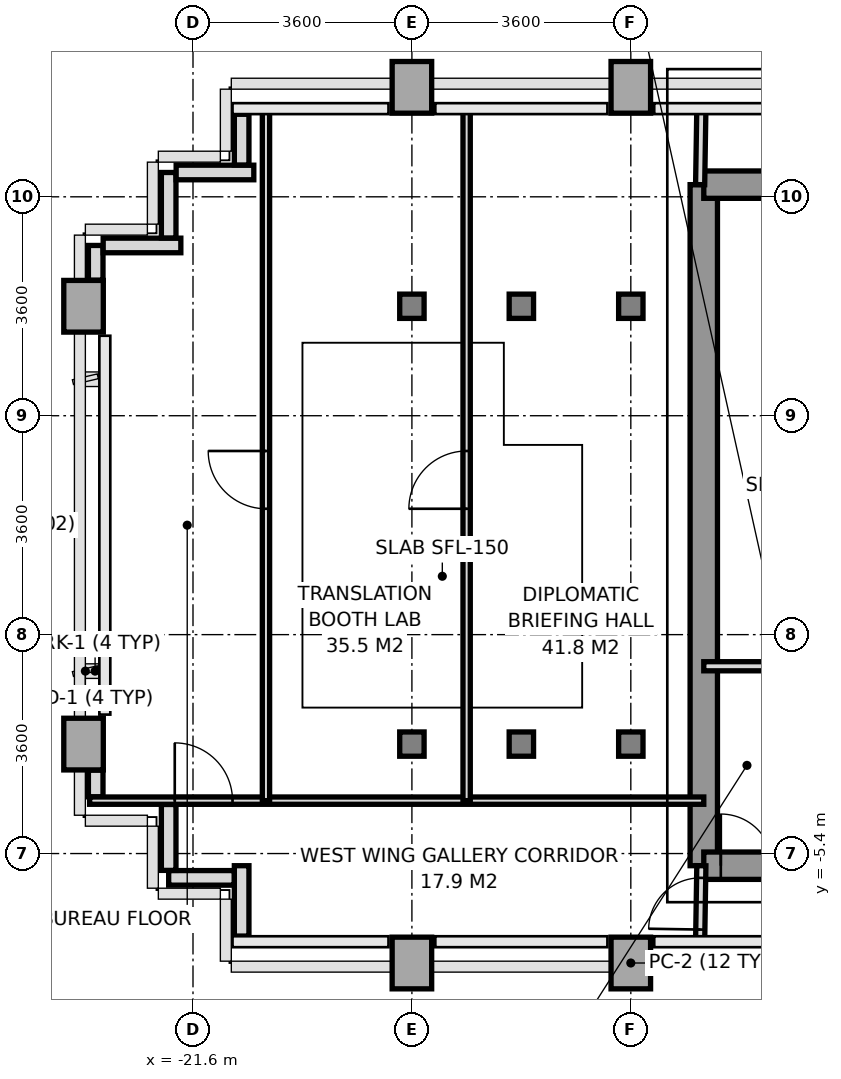
"""IFC4 building model, lengths in metres.
Left out: names, types, materials, properties, quantities, classifications, styles, units other than length and angle.
Written with IfcOpenShell. Run it as: python <this file> out.ifc"""

import sys

from ifc_helpers import new_model, si_unit, direction, frame, frame_2d, origin, origin_2d, place, context, subcontext, project, spatial, rectangle, i_section, extrude, source, transform, mapped, element, fill, save


model = new_model("IFC4")
c1 = context("Model", 3, precision=1e-05, world=origin(), true_north=direction((0.0, 1.0)))
c2 = subcontext(c1, "Body", "Model", "MODEL_VIEW")
j1 = project(units=[si_unit("LENGTHUNIT", "METRE"), si_unit("PLANEANGLEUNIT", "RADIAN")], contexts=[c1])
p1 = place(None, origin())
s1 = spatial("IfcSite", under=j1, at=p1, CompositionType="ELEMENT")
p2 = place(p1, origin())
s2 = spatial("IfcBuilding", under=s1, at=p2, CompositionType="ELEMENT")
p3 = place(p2, frame((0.0, 0.0, 121.0)))
s3 = spatial("IfcBuildingStorey", under=s2, at=p3, CompositionType="ELEMENT", Elevation=121.0)
m1 = source(origin(), c2, "Body", "SweptSolid", [
    extrude(rectangle(XDim=0.65, YDim=0.85, at=origin_2d()), origin(), (0.0, 0.0, 1.0), 3.2),
])
for number, where, z_axis, x_axis in (
    (1, (-23.4, -3.6, 0.0), (0.0, 0.0, 1.0), (1.0, 0.0, 0.0)),
    (2, (-23.4, 3.6, 0.0), (0.0, 0.0, 1.0), (1.0, 0.0, 0.0)),
    (3, (-18.0, -7.2, 0.0), (0.0, 0.0, 1.0), (1.0, 0.0, 0.0)),
):
    element("IfcColumn", number, at=place(p3, frame(where, z_axis=z_axis, x_axis=x_axis)), inside=s3, PredefinedType="COLUMN", context=c2, shape_type="MappedRepresentation", body=[
        mapped(m1, transform((0.0, 0.0, 0.0), x_axis=(1.0, 0.0, 0.0), y_axis=(0.0, 1.0, 0.0), z_axis=(0.0, 0.0, 1.0), scale=1.0)),
    ])
m2 = source(origin(), c2, "Body", "SweptSolid", [
    extrude(i_section(OverallWidth=0.401, OverallDepth=0.399, WebThickness=0.02, FlangeThickness=0.032, at=origin_2d()), origin(), (0.0, 0.0, 1.0), 3.2),
])
for number, where, z_axis, x_axis in (
    (4, (-18.0, -3.6, 0.0), (0.0, 0.0, 1.0), (1.0, 0.0, 0.0)),
    (5, (-18.0, 3.6, 0.0), (0.0, 0.0, 1.0), (1.0, 0.0, 0.0)),
):
    element("IfcColumn", number, at=place(p3, frame(where, z_axis=z_axis, x_axis=x_axis)), inside=s3, PredefinedType="COLUMN", context=c2, shape_type="MappedRepresentation", body=[
        mapped(m2, transform((0.0, 0.0, 0.0), x_axis=(1.0, 0.0, 0.0), y_axis=(0.0, 1.0, 0.0), z_axis=(0.0, 0.0, 1.0), scale=1.0)),
    ])
p4 = place(p3, frame((-18.0, 7.2, 0.0), z_axis=(0.0, 0.0, 1.0), x_axis=(1.0, 0.0, 0.0)))
e6 = element("IfcColumn", 6, at=p4, inside=s3, PredefinedType="COLUMN", context=c2, shape_type="MappedRepresentation", body=[
    mapped(m1, transform((0.0, 0.0, 0.0), x_axis=(1.0, 0.0, 0.0), y_axis=(0.0, 1.0, 0.0), z_axis=(0.0, 0.0, 1.0), scale=1.0)),
])
for number, where, z_axis, x_axis in (
    (7, (-16.2, -3.6, 0.0), (0.0, 0.0, 1.0), (1.0, 0.0, 0.0)),
    (8, (-16.2, 3.6, 0.0), (0.0, 0.0, 1.0), (1.0, 0.0, 0.0)),
):
    element("IfcColumn", number, at=place(p3, frame(where, z_axis=z_axis, x_axis=x_axis)), inside=s3, PredefinedType="COLUMN", context=c2, shape_type="MappedRepresentation", body=[
        mapped(m2, transform((0.0, 0.0, 0.0), x_axis=(1.0, 0.0, 0.0), y_axis=(0.0, 1.0, 0.0), z_axis=(0.0, 0.0, 1.0), scale=1.0)),
    ])
p5 = place(p3, frame((-14.4, -7.2, 0.0), z_axis=(0.0, 0.0, 1.0), x_axis=(1.0, 0.0, 0.0)))
e9 = element("IfcColumn", 9, at=p5, inside=s3, PredefinedType="COLUMN", context=c2, shape_type="MappedRepresentation", body=[
    mapped(m1, transform((0.0, 0.0, 0.0), x_axis=(1.0, 0.0, 0.0), y_axis=(0.0, 1.0, 0.0), z_axis=(0.0, 0.0, 1.0), scale=1.0)),
])
for number, where, z_axis, x_axis in (
    (10, (-14.4, -3.6, 0.0), (0.0, 0.0, 1.0), (1.0, 0.0, 0.0)),
    (11, (-14.4, 3.6, 0.0), (0.0, 0.0, 1.0), (1.0, 0.0, 0.0)),
):
    element("IfcColumn", number, at=place(p3, frame(where, z_axis=z_axis, x_axis=x_axis)), inside=s3, PredefinedType="COLUMN", context=c2, shape_type="MappedRepresentation", body=[
        mapped(m2, transform((0.0, 0.0, 0.0), x_axis=(1.0, 0.0, 0.0), y_axis=(0.0, 1.0, 0.0), z_axis=(0.0, 0.0, 1.0), scale=1.0)),
    ])
p6 = place(p3, frame((-14.4, 7.2, 0.0), z_axis=(0.0, 0.0, 1.0), x_axis=(1.0, 0.0, 0.0)))
e12 = element("IfcColumn", 12, at=p6, inside=s3, PredefinedType="COLUMN", context=c2, shape_type="MappedRepresentation", body=[
    mapped(m1, transform((0.0, 0.0, 0.0), x_axis=(1.0, 0.0, 0.0), y_axis=(0.0, 1.0, 0.0), z_axis=(0.0, 0.0, 1.0), scale=1.0)),
])
p7 = place(p3, frame((-20.8, -6.757, 0.0), z_axis=(0.0, 0.0, 1.0), x_axis=(0.0, 1.0, 0.0)))
e13 = element("IfcWall", 13, at=p7, inside=s3, PredefinedType="PARAPET", context=c2, shape_type="SweptSolid", body=[
    extrude(rectangle(XDim=1.157, YDim=0.24, at=frame_2d((0.579, 0.0))), origin(), (0.0, 0.0, 1.0), 1.15),
])
p8 = place(p3, frame((-20.923, -5.8, 0.0), z_axis=(0.0, 0.0, 1.0), x_axis=(-1.0, 0.0, 0.0)))
e14 = element("IfcWall", 14, at=p8, inside=s3, PredefinedType="PARAPET", context=c2, shape_type="SweptSolid", body=[
    extrude(rectangle(XDim=1.077, YDim=0.24, at=frame_2d((0.539, 0.0))), origin(), (0.0, 0.0, 1.0), 1.15),
])
p9 = place(p3, frame((-22.0, -5.677, 0.0), z_axis=(0.0, 0.0, 1.0), x_axis=(0.0, 1.0, 0.0)))
e15 = element("IfcWall", 15, at=p9, inside=s3, PredefinedType="PARAPET", context=c2, shape_type="SweptSolid", body=[
    extrude(rectangle(XDim=1.084, YDim=0.24, at=frame_2d((0.542, 0.0))), origin(), (0.0, 0.0, 1.0), 1.15),
])
p10 = place(p3, frame((-23.2, -4.467, 0.0), z_axis=(0.0, 0.0, 1.0), x_axis=(0.0, 1.0, 0.0)))
e16 = element("IfcWall", 16, at=p10, inside=s3, PredefinedType="PARAPET", context=c2, shape_type="SweptSolid", body=[
    extrude(rectangle(XDim=0.439, YDim=0.24, at=frame_2d((0.219, 0.0))), origin(), (0.0, 0.0, 1.0), 1.15),
])
p11 = place(p3, frame((-23.2, 4.028, 0.0), z_axis=(0.0, 0.0, 1.0), x_axis=(0.0, 1.0, 0.0)))
e17 = element("IfcWall", 17, at=p11, inside=s3, PredefinedType="PARAPET", context=c2, shape_type="SweptSolid", body=[
    extrude(rectangle(XDim=0.572, YDim=0.24, at=frame_2d((0.286, 0.0))), origin(), (0.0, 0.0, 1.0), 1.15),
])
p12 = place(p3, frame((-23.077, 4.6, 0.0), z_axis=(0.0, 0.0, 1.0), x_axis=(1.0, 0.0, 0.0)))
e18 = element("IfcWall", 18, at=p12, inside=s3, PredefinedType="PARAPET", context=c2, shape_type="SweptSolid", body=[
    extrude(rectangle(XDim=1.277, YDim=0.24, at=frame_2d((0.638, 0.0))), origin(), (0.0, 0.0, 1.0), 1.15),
])
p13 = place(p3, frame((-22.0, 4.723, 0.0), z_axis=(0.0, 0.0, 1.0), x_axis=(0.0, 1.0, 0.0)))
e19 = element("IfcWall", 19, at=p13, inside=s3, PredefinedType="PARAPET", context=c2, shape_type="SweptSolid", body=[
    extrude(rectangle(XDim=1.077, YDim=0.24, at=frame_2d((0.539, 0.0))), origin(), (0.0, 0.0, 1.0), 1.15),
])
p14 = place(p3, frame((-21.877, 5.8, 0.0), z_axis=(0.0, 0.0, 1.0), x_axis=(1.0, 0.0, 0.0)))
e20 = element("IfcWall", 20, at=p14, inside=s3, PredefinedType="PARAPET", context=c2, shape_type="SweptSolid", body=[
    extrude(rectangle(XDim=1.277, YDim=0.24, at=frame_2d((0.638, 0.0))), origin(), (0.0, 0.0, 1.0), 1.15),
])
p15 = place(p3, frame((-20.8, 5.923, 0.0), z_axis=(0.0, 0.0, 1.0), x_axis=(0.0, 1.0, 0.0)))
e21 = element("IfcWall", 21, at=p15, inside=s3, PredefinedType="PARAPET", context=c2, shape_type="SweptSolid", body=[
    extrude(rectangle(XDim=0.834, YDim=0.24, at=frame_2d((0.417, 0.0))), origin(), (0.0, 0.0, 1.0), 1.15),
])
p16 = place(p3, frame((-13.2, -5.6, 0.0), z_axis=(0.0, 0.0, 1.0), x_axis=(0.0, 1.0, 0.0)))
e22 = element("IfcWall", 22, at=p16, inside=s3, PredefinedType="SHEAR", context=c2, shape_type="SweptSolid", body=[
    extrude(rectangle(XDim=11.2, YDim=0.45, at=frame_2d((5.6, 0.0))), origin(), (0.0, 0.0, 1.0), 3.2),
])
p17 = place(p3, frame((-13.2, 5.6, 0.0), z_axis=(0.0, 0.0, 1.0), x_axis=(1.0, 0.0, 0.0)))
e23 = element("IfcWall", 23, at=p17, inside=s3, PredefinedType="SHEAR", context=c2, shape_type="SweptSolid", body=[
    extrude(rectangle(XDim=1.819, YDim=0.45, at=frame_2d((0.909, 0.0))), origin(), (0.0, 0.0, 1.0), 3.2),
])
p18 = place(p3, frame((-13.2, -5.6, 0.0), z_axis=(0.0, 0.0, 1.0), x_axis=(1.0, 0.0, 0.0)))
e24 = element("IfcWall", 24, at=p18, inside=s3, PredefinedType="SHEAR", context=c2, shape_type="SweptSolid", body=[
    extrude(rectangle(XDim=7.8, YDim=0.45, at=frame_2d((3.9, 0.0))), origin(), (0.0, 0.0, 1.0), 3.2),
])
p19 = place(p18, frame((3.6, 0.0, 0.0)))
e25 = element("IfcOpeningElement", 25, at=p19, cuts=e24, PredefinedType="OPENING", context=c2, shape_type="SweptSolid", body=[
    extrude(rectangle(XDim=1.2, YDim=2.2, at=frame_2d((0.6, 1.1))), frame((0.0, 0.235, 0.0), z_axis=(0.0, -1.0, 0.0), x_axis=(1.0, 0.0, 0.0)), (0.0, 0.0, 1.0), 0.47),
])
p20 = place(p18, frame((0.28, 0.0, 0.0)))
e26 = element("IfcOpeningElement", 26, at=p20, cuts=e24, PredefinedType="OPENING", context=c2, shape_type="SweptSolid", body=[
    extrude(rectangle(XDim=0.85, YDim=2.1, at=frame_2d((0.425, 1.05))), frame((0.0, 0.235, 0.0), z_axis=(0.0, -1.0, 0.0), x_axis=(1.0, 0.0, 0.0)), (0.0, 0.0, 1.0), 0.47),
])
p21 = place(p18, frame((1.36, 0.0, 0.0)))
e27 = element("IfcOpeningElement", 27, at=p21, cuts=e24, PredefinedType="OPENING", context=c2, shape_type="SweptSolid", body=[
    extrude(rectangle(XDim=0.85, YDim=2.1, at=frame_2d((0.425, 1.05))), frame((0.0, 0.235, 0.0), z_axis=(0.0, -1.0, 0.0), x_axis=(1.0, 0.0, 0.0)), (0.0, 0.0, 1.0), 0.47),
])
p22 = place(p3, frame((-13.2, -2.32, 0.0), z_axis=(0.0, 0.0, 1.0), x_axis=(1.0, 0.0, 0.0)))
e28 = element("IfcWall", 28, at=p22, inside=s3, PredefinedType="PARTITIONING", context=c2, shape_type="SweptSolid", body=[
    extrude(rectangle(XDim=2.18, YDim=0.15, at=frame_2d((1.09, 0.0))), origin(), (0.0, 0.0, 1.0), 3.2),
])
p23 = place(p3, frame((-13.26, 5.6, 0.0), z_axis=(0.0, 0.0, 1.0), x_axis=(0.016013571389, 0.999871774545, 0.0)))
e29 = element("IfcWall", 29, at=p23, inside=s3, PredefinedType="PARTITIONING", context=c2, shape_type="SweptSolid", body=[
    extrude(rectangle(XDim=1.25, YDim=0.15, at=frame_2d((0.625, 0.0))), origin(), (0.0, 0.0, 1.0), 3.2),
])
p24 = place(p3, frame((-13.26, -6.85, 0.0), z_axis=(0.0, 0.0, 1.0), x_axis=(0.016013571389, 0.999871774545, 0.0)))
e30 = element("IfcWall", 30, at=p24, inside=s3, PredefinedType="PARTITIONING", context=c2, shape_type="SweptSolid", body=[
    extrude(rectangle(XDim=1.25, YDim=0.15, at=frame_2d((0.625, 0.0))), origin(), (0.0, 0.0, 1.0), 3.2),
])
p25 = place(p24, frame((0.2, 0.0, 0.0)))
e31 = element("IfcOpeningElement", 31, at=p25, cuts=e30, PredefinedType="OPENING", context=c2, shape_type="SweptSolid", body=[
    extrude(rectangle(XDim=0.85, YDim=2.1, at=frame_2d((0.425, 1.05))), frame((0.0, 0.085, 0.0), z_axis=(0.0, -1.0, 0.0), x_axis=(1.0, 0.0, 0.0)), (0.0, 0.0, 1.0), 0.17),
])
p26 = place(p3, frame((-23.3, -4.53, 0.0), z_axis=(0.0, 0.0, 1.0), x_axis=(1.0, 0.0, 0.0)))
e32 = element("IfcWall", 32, at=p26, inside=s3, PredefinedType="PARTITIONING", context=c2, shape_type="SweptSolid", body=[
    extrude(rectangle(XDim=10.1, YDim=0.12, at=frame_2d((5.05, 0.0))), origin(), (0.0, 0.0, 1.0), 2.75),
])
p27 = place(p26, frame((1.4, 0.0, 0.0)))
e33 = element("IfcOpeningElement", 33, at=p27, cuts=e32, PredefinedType="OPENING", context=c2, shape_type="SweptSolid", body=[
    extrude(rectangle(XDim=0.95, YDim=2.15, at=frame_2d((0.475, 1.075))), frame((0.0, 0.07, 0.0), z_axis=(0.0, -1.0, 0.0), x_axis=(1.0, 0.0, 0.0)), (0.0, 0.0, 1.0), 0.14),
])
p28 = place(p3, frame((-20.4, -4.53, 0.0), z_axis=(0.0, 0.0, 1.0), x_axis=(0.0, 1.0, 0.0)))
e34 = element("IfcWall", 34, at=p28, inside=s3, PredefinedType="PARTITIONING", context=c2, shape_type="SweptSolid", body=[
    extrude(rectangle(XDim=11.38, YDim=0.12, at=frame_2d((5.69, 0.0))), origin(), (0.0, 0.0, 1.0), 2.7),
])
p29 = place(p28, frame((4.8, 0.0, 0.0)))
e35 = element("IfcOpeningElement", 35, at=p29, cuts=e34, PredefinedType="OPENING", context=c2, shape_type="SweptSolid", body=[
    extrude(rectangle(XDim=0.95, YDim=2.15, at=frame_2d((0.475, 1.075))), frame((0.0, 0.07, 0.0), z_axis=(0.0, -1.0, 0.0), x_axis=(1.0, 0.0, 0.0)), (0.0, 0.0, 1.0), 0.14),
])
p30 = place(p3, frame((-17.1, -4.53, 0.0), z_axis=(0.0, 0.0, 1.0), x_axis=(0.0, 1.0, 0.0)))
e36 = element("IfcWall", 36, at=p30, inside=s3, PredefinedType="PARTITIONING", context=c2, shape_type="SweptSolid", body=[
    extrude(rectangle(XDim=11.38, YDim=0.12, at=frame_2d((5.69, 0.0))), origin(), (0.0, 0.0, 1.0), 2.7),
])
p31 = place(p30, frame((4.8, 0.0, 0.0)))
e37 = element("IfcOpeningElement", 37, at=p31, cuts=e36, PredefinedType="OPENING", context=c2, shape_type="SweptSolid", body=[
    extrude(rectangle(XDim=0.95, YDim=2.15, at=frame_2d((0.475, 1.075))), frame((0.0, 0.07, 0.0), z_axis=(0.0, -1.0, 0.0), x_axis=(1.0, 0.0, 0.0)), (0.0, 0.0, 1.0), 0.14),
])
m3 = source(origin(), c2, "Body", "SweptSolid", [
    extrude(rectangle(XDim=0.85, YDim=2.1, at=frame_2d((0.425, 1.05))), frame((0.0, 0.025, 0.0), z_axis=(0.0, -1.0, 0.0), x_axis=(1.0, 0.0, 0.0)), (0.0, 0.0, 1.0), 0.05),
])
p32 = place(p20, origin())
e38 = element("IfcDoor", 38, at=p32, inside=s3, OperationType="SINGLE_SWING_LEFT", PredefinedType="DOOR", context=c2, shape_type="MappedRepresentation", body=[
    mapped(m3, transform((0.0, 0.0, 0.0), x_axis=(1.0, 0.0, 0.0), y_axis=(0.0, 1.0, 0.0), z_axis=(0.0, 0.0, 1.0), scale=1.0)),
])
fill(e26, e38)
p33 = place(p25, origin())
e39 = element("IfcDoor", 39, at=p33, inside=s3, OperationType="SINGLE_SWING_LEFT", PredefinedType="DOOR", context=c2, shape_type="MappedRepresentation", body=[
    mapped(m3, transform((0.0, 0.0, 0.0), x_axis=(1.0, 0.0, 0.0), y_axis=(0.0, 1.0, 0.0), z_axis=(0.0, 0.0, 1.0), scale=1.0)),
])
fill(e31, e39)
m4 = source(origin(), c2, "Body", "SweptSolid", [
    extrude(rectangle(XDim=0.95, YDim=2.15, at=frame_2d((0.475, 1.075))), frame((0.0, 0.025, 0.0), z_axis=(0.0, -1.0, 0.0), x_axis=(1.0, 0.0, 0.0)), (0.0, 0.0, 1.0), 0.05),
])
p34 = place(p27, origin())
e40 = element("IfcDoor", 40, at=p34, inside=s3, OperationType="SINGLE_SWING_LEFT", PredefinedType="DOOR", context=c2, shape_type="MappedRepresentation", body=[
    mapped(m4, transform((0.0, 0.0, 0.0), x_axis=(1.0, 0.0, 0.0), y_axis=(0.0, 1.0, 0.0), z_axis=(0.0, 0.0, 1.0), scale=1.0)),
])
fill(e33, e40)
p35 = place(p29, origin())
e41 = element("IfcDoor", 41, at=p35, inside=s3, OperationType="SINGLE_SWING_RIGHT", PredefinedType="DOOR", context=c2, shape_type="MappedRepresentation", body=[
    mapped(m4, transform((0.0, 0.0, 0.0), x_axis=(1.0, 0.0, 0.0), y_axis=(0.0, 1.0, 0.0), z_axis=(0.0, 0.0, 1.0), scale=1.0)),
])
fill(e35, e41)
p36 = place(p31, origin())
e42 = element("IfcDoor", 42, at=p36, inside=s3, OperationType="SINGLE_SWING_LEFT", PredefinedType="DOOR", context=c2, shape_type="MappedRepresentation", body=[
    mapped(m4, transform((0.0, 0.0, 0.0), x_axis=(1.0, 0.0, 0.0), y_axis=(0.0, 1.0, 0.0), z_axis=(0.0, 0.0, 1.0), scale=1.0)),
])
fill(e37, e42)
save(model, sys.argv[1])
